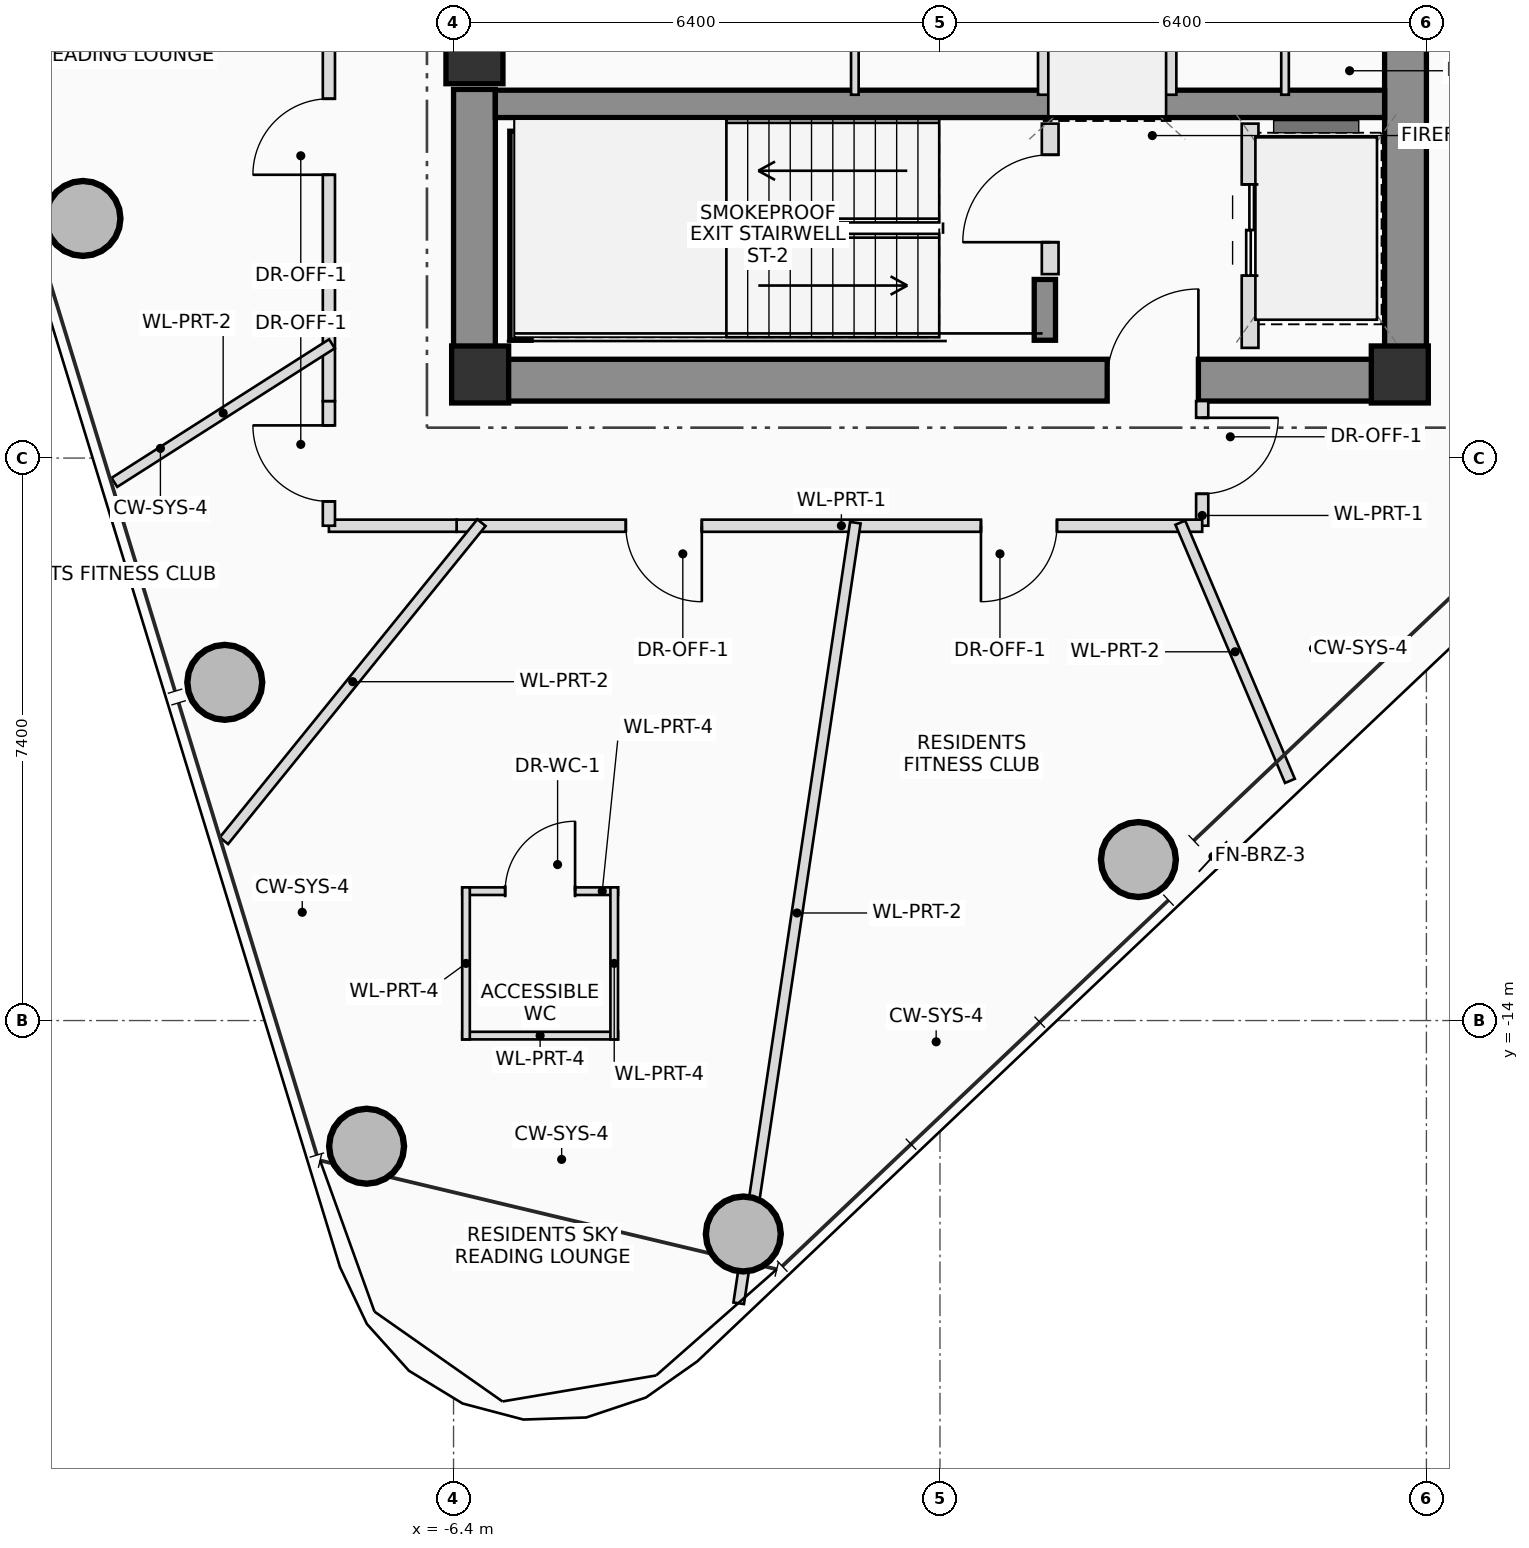
"""IFC4 building model, lengths in metres.
Left out: names, types, materials, properties, quantities, classifications, styles, units other than length and angle.
Written with IfcOpenShell. Run it as: python <this file> out.ifc"""

import sys

from ifc_helpers import new_model, si_unit, direction, frame, frame_2d, origin, origin_2d, place, context, subcontext, project, spatial, rectangle, hollow_circle, extrude, source, transform, mapped, element, fill, save


model = new_model("IFC4")
c1 = context("Model", 3, precision=1e-05, world=origin(), true_north=direction((0.0, 1.0)))
c2 = subcontext(c1, "Body", "Model", "MODEL_VIEW")
j1 = project(units=[si_unit("LENGTHUNIT", "METRE"), si_unit("PLANEANGLEUNIT", "RADIAN")], contexts=[c1])
p1 = place(None, origin())
s1 = spatial("IfcSite", under=j1, at=p1, CompositionType="ELEMENT")
p2 = place(p1, origin())
s2 = spatial("IfcBuilding", under=s1, at=p2, CompositionType="ELEMENT")
p3 = place(p2, frame((0.0, 0.0, 228.65)))
s3 = spatial("IfcBuildingStorey", under=s2, at=p3, CompositionType="ELEMENT", Elevation=228.65)
m1 = source(origin(), c2, "Body", "SweptSolid", [
    extrude(rectangle(XDim=0.75, YDim=0.75, at=origin_2d()), origin(), (0.0, 0.0, 1.0), 3.4),
])
for number, where, z_axis, x_axis in (
    (1, (-6.05, -5.5, 0.0), (0.0, 0.0, 1.0), (1.0, 0.0, 0.0)),
    (2, (6.05, -5.5, 0.0), (0.0, 0.0, 1.0), (1.0, 0.0, 0.0)),
):
    element("IfcColumn", number, at=place(p3, frame(where, z_axis=z_axis, x_axis=x_axis)), inside=s3, PredefinedType="COLUMN", context=c2, shape_type="MappedRepresentation", body=[
        mapped(m1, transform((0.0, 0.0, 0.0), scale=1.0)),
    ])
p4 = place(p3, frame((-6.4, -5.575, 0.0), z_axis=(0.0, 0.0, 1.0), x_axis=(1.0, 0.0, 0.0)))
e3 = element("IfcWall", 3, at=p4, inside=s3, PredefinedType="SHEAR", context=c2, shape_type="SweptSolid", body=[
    extrude(rectangle(XDim=12.8, YDim=0.55, at=frame_2d((6.4, 0.0))), origin(), (0.0, 0.0, 1.0), 3.4),
])
p5 = place(p4, frame((8.6, 0.0, 0.0)))
e4 = element("IfcOpeningElement", 4, at=p5, cuts=e3, PredefinedType="OPENING", context=c2, shape_type="SweptSolid", body=[
    extrude(rectangle(XDim=1.2, YDim=2.2, at=frame_2d((0.6, 1.1))), frame((0.0, 0.285, 0.0), z_axis=(0.0, -1.0, 0.0), x_axis=(1.0, 0.0, 0.0)), (0.0, 0.0, 1.0), 0.57),
])
p6 = place(p3, frame((6.125, -5.3, 0.0), z_axis=(0.0, 0.0, 1.0), x_axis=(0.0, 1.0, 0.0)))
e5 = element("IfcWall", 5, at=p6, inside=s3, PredefinedType="SHEAR", context=c2, shape_type="SweptSolid", body=[
    extrude(rectangle(XDim=10.6, YDim=0.55, at=frame_2d((5.3, 0.0))), origin(), (0.0, 0.0, 1.0), 3.4),
])
p7 = place(p3, frame((-6.125, -5.3, 0.0), z_axis=(0.0, 0.0, 1.0), x_axis=(0.0, 1.0, 0.0)))
e6 = element("IfcWall", 6, at=p7, inside=s3, PredefinedType="SHEAR", context=c2, shape_type="SweptSolid", body=[
    extrude(rectangle(XDim=3.55, YDim=0.55, at=frame_2d((1.775, 0.0))), origin(), (0.0, 0.0, 1.0), 3.4),
])
p8 = place(p3, frame((-5.85, -1.94, 0.0), z_axis=(0.0, 0.0, 1.0), x_axis=(1.0, 0.0, 0.0)))
e7 = element("IfcWall", 7, at=p8, inside=s3, PredefinedType="SHEAR", context=c2, shape_type="SweptSolid", body=[
    extrude(rectangle(XDim=11.7, YDim=0.36, at=frame_2d((5.85, 0.0))), origin(), (0.0, 0.0, 1.0), 3.4),
])
p9 = place(p3, frame((-5.52, -5.05, 0.0), z_axis=(0.0, 0.0, 1.0), x_axis=(0.0, 1.0, 0.0)))
e8 = element("IfcWall", 8, at=p9, inside=s3, PredefinedType="SHEAR", context=c2, shape_type="SweptSolid", body=[
    extrude(rectangle(XDim=2.75, YDim=0.28, at=frame_2d((1.375, 0.0))), origin(), (0.0, 0.0, 1.0), 3.4),
])
p10 = place(p3, frame((1.38, -5.05, 0.0), z_axis=(0.0, 0.0, 1.0), x_axis=(0.0, 1.0, 0.0)))
e9 = element("IfcWall", 9, at=p10, inside=s3, PredefinedType="SHEAR", context=c2, shape_type="SweptSolid", body=[
    extrude(rectangle(XDim=0.8, YDim=0.28, at=frame_2d((0.4, 0.0))), origin(), (0.0, 0.0, 1.0), 3.4),
])
p11 = place(p3, frame((-6.125, -1.3, 0.0), z_axis=(0.0, 0.0, 1.0), x_axis=(1.0, 0.0, 0.0)))
e10 = element("IfcColumn", 10, at=p11, inside=s3, PredefinedType="COLUMN", context=c2, shape_type="MappedRepresentation", body=[
    mapped(m1, transform((0.0, 0.0, 0.0), scale=1.0)),
])
m2 = source(origin(), c2, "Body", "SweptSolid", [
    extrude(hollow_circle(Radius=0.5, WallThickness=0.04, at=origin_2d()), origin(), (0.0, 0.0, 1.0), 3.4),
])
for number, where, z_axis, x_axis in (
    (11, (-2.587, -16.808, 0.0), (0.0, 0.0, 1.0), (1.0, 0.0, 0.0)),
    (12, (2.611, -11.882, 0.0), (0.0, 0.0, 1.0), (1.0, 0.0, 0.0)),
    (13, (-11.276, -3.448, 0.0), (0.0, 0.0, 1.0), (1.0, 0.0, 0.0)),
    (14, (-9.41, -9.55, 0.0), (0.0, 0.0, 1.0), (1.0, 0.0, 0.0)),
    (15, (-7.544, -15.653, 0.0), (0.0, 0.0, 1.0), (1.0, 0.0, 0.0)),
):
    element("IfcColumn", number, at=place(p3, frame(where, z_axis=z_axis, x_axis=x_axis)), inside=s3, PredefinedType="COLUMN", context=c2, shape_type="MappedRepresentation", body=[
        mapped(m2, transform((0.0, 0.0, 0.0), scale=1.0)),
    ])
p12 = place(p3, frame((1.45, -4.18, 0.0), z_axis=(0.0, 0.0, 1.0), x_axis=(0.0, 1.0, 0.0)))
e16 = element("IfcWall", 16, at=p12, inside=s3, PredefinedType="PLUMBINGWALL", context=c2, shape_type="SweptSolid", body=[
    extrude(rectangle(XDim=1.98, YDim=0.22, at=frame_2d((0.99, 0.0))), origin(), (0.0, 0.0, 1.0), 3.2),
])
p13 = place(p12, frame((0.42, 0.0, 0.0)))
e17 = element("IfcOpeningElement", 17, at=p13, cuts=e16, PredefinedType="OPENING", context=c2, shape_type="SweptSolid", body=[
    extrude(rectangle(XDim=1.15, YDim=2.15, at=frame_2d((0.575, 1.075))), frame((0.0, 0.12, 0.0), z_axis=(0.0, -1.0, 0.0), x_axis=(1.0, 0.0, 0.0)), (0.0, 0.0, 1.0), 0.24),
])
p14 = place(p3, frame((4.08, -5.15, 0.0), z_axis=(0.0, 0.0, 1.0), x_axis=(0.0, 1.0, 0.0)))
e18 = element("IfcWall", 18, at=p14, inside=s3, PredefinedType="PLUMBINGWALL", context=c2, shape_type="SweptSolid", body=[
    extrude(rectangle(XDim=2.95, YDim=0.22, at=frame_2d((1.475, 0.0))), origin(), (0.0, 0.0, 1.0), 3.2),
])
p15 = place(p14, frame((0.95, 0.0, 0.0)))
e19 = element("IfcOpeningElement", 19, at=p15, cuts=e18, PredefinedType="OPENING", context=c2, shape_type="SweptSolid", body=[
    extrude(rectangle(XDim=1.2, YDim=2.25, at=frame_2d((0.6, 1.125))), frame((0.0, 0.12, 0.0), z_axis=(0.0, -1.0, 0.0), x_axis=(1.0, 0.0, 0.0)), (0.0, 0.0, 1.0), 0.24),
])
p16 = place(p3, frame((-1.12, -1.82, 0.0), z_axis=(0.0, 0.0, 1.0), x_axis=(0.0, 1.0, 0.0)))
e20 = element("IfcWall", 20, at=p16, inside=s3, PredefinedType="PARTITIONING", context=c2, shape_type="SweptSolid", body=[
    extrude(rectangle(XDim=0.98, YDim=0.1, at=frame_2d((0.49, 0.0))), origin(), (0.0, 0.0, 1.0), 3.2),
])
for number, where, z_axis, x_axis in (
    (21, (1.38, -1.82, 0.0), (0.0, 0.0, 1.0), (0.0, 1.0, 0.0)),
    (22, (3.02, -1.82, 0.0), (0.0, 0.0, 1.0), (0.0, 1.0, 0.0)),
):
    element("IfcWall", number, at=place(p3, frame(where, z_axis=z_axis, x_axis=x_axis)), inside=s3, PredefinedType="PLUMBINGWALL", context=c2, shape_type="SweptSolid", body=[
        extrude(rectangle(XDim=0.98, YDim=0.18, at=frame_2d((0.49, 0.0))), origin(), (0.0, 0.0, 1.0), 3.2),
    ])
p17 = place(p3, frame((4.54, -1.82, 0.0), z_axis=(0.0, 0.0, 1.0), x_axis=(0.0, 1.0, 0.0)))
e23 = element("IfcWall", 23, at=p17, inside=s3, PredefinedType="PARTITIONING", context=c2, shape_type="SweptSolid", body=[
    extrude(rectangle(XDim=0.98, YDim=0.1, at=frame_2d((0.49, 0.0))), origin(), (0.0, 0.0, 1.0), 3.2),
])
p18 = place(p3, frame((-6.286, -12.298, 0.0), z_axis=(0.0, 0.0, 1.0), x_axis=(1.0, 0.0, 0.0)))
e24 = element("IfcWall", 24, at=p18, inside=s3, PredefinedType="PARTITIONING", context=c2, shape_type="SweptSolid", body=[
    extrude(rectangle(XDim=2.05, YDim=0.1, at=frame_2d((1.025, 0.0))), origin(), (0.0, 0.0, 1.0), 3.2),
])
p19 = place(p18, frame((0.565, 0.0, 0.0)))
e25 = element("IfcOpeningElement", 25, at=p19, cuts=e24, PredefinedType="OPENING", context=c2, shape_type="SweptSolid", body=[
    extrude(rectangle(XDim=0.92, YDim=2.1, at=frame_2d((0.46, 1.05))), frame((0.0, 0.06, 0.0), z_axis=(0.0, -1.0, 0.0), x_axis=(1.0, 0.0, 0.0)), (0.0, 0.0, 1.0), 0.12),
])
p20 = place(p3, frame((-4.236, -14.198, 0.0), z_axis=(0.0, 0.0, 1.0), x_axis=(-1.0, 0.0, 0.0)))
e26 = element("IfcWall", 26, at=p20, inside=s3, PredefinedType="PARTITIONING", context=c2, shape_type="SweptSolid", body=[
    extrude(rectangle(XDim=2.05, YDim=0.1, at=frame_2d((1.025, 0.0))), origin(), (0.0, 0.0, 1.0), 3.2),
])
for number, where, z_axis, x_axis in (
    (27, (-4.286, -12.248, 0.0), (0.0, 0.0, 1.0), (0.0, -1.0, 0.0)),
    (28, (-6.236, -14.248, 0.0), (0.0, 0.0, 1.0), (0.0, 1.0, 0.0)),
):
    element("IfcWall", number, at=place(p3, frame(where, z_axis=z_axis, x_axis=x_axis)), inside=s3, PredefinedType="PARTITIONING", context=c2, shape_type="SweptSolid", body=[
        extrude(rectangle(XDim=2.0, YDim=0.1, at=frame_2d((1.0, 0.0))), origin(), (0.0, 0.0, 1.0), 2.855),
    ])
p21 = place(p3, frame((3.45, -5.85, 0.0), z_axis=(0.0, 0.0, 1.0), x_axis=(0.0, -1.0, 0.0)))
e29 = element("IfcWall", 29, at=p21, inside=s3, PredefinedType="PARTITIONING", context=c2, shape_type="SweptSolid", body=[
    extrude(rectangle(XDim=1.64, YDim=0.16, at=frame_2d((0.82, 0.0))), origin(), (0.0, 0.0, 1.0), 3.2),
])
p22 = place(p21, frame((0.22, 0.0, 0.0)))
e30 = element("IfcOpeningElement", 30, at=p22, cuts=e29, PredefinedType="OPENING", context=c2, shape_type="SweptSolid", body=[
    extrude(rectangle(XDim=1.0, YDim=2.25, at=frame_2d((0.5, 1.125))), frame((0.0, 0.09, 0.0), z_axis=(0.0, -1.0, 0.0), x_axis=(1.0, 0.0, 0.0)), (0.0, 0.0, 1.0), 0.18),
])
p23 = place(p3, frame((3.45, -7.49, 0.0), z_axis=(0.0, 0.0, 1.0), x_axis=(-1.0, 0.0, 0.0)))
e31 = element("IfcWall", 31, at=p23, inside=s3, PredefinedType="PARTITIONING", context=c2, shape_type="SweptSolid", body=[
    extrude(rectangle(XDim=9.81, YDim=0.16, at=frame_2d((4.905, 0.0))), origin(), (0.0, 0.0, 1.0), 2.605),
])
p24 = place(p23, frame((1.911, 0.0, 0.0)))
e32 = element("IfcOpeningElement", 32, at=p24, cuts=e31, PredefinedType="OPENING", context=c2, shape_type="SweptSolid", body=[
    extrude(rectangle(XDim=1.0, YDim=2.25, at=frame_2d((0.5, 1.125))), frame((0.0, 0.09, 0.0), z_axis=(0.0, -1.0, 0.0), x_axis=(1.0, 0.0, 0.0)), (0.0, 0.0, 1.0), 0.18),
])
p25 = place(p23, frame((6.583, 0.0, 0.0)))
e33 = element("IfcOpeningElement", 33, at=p25, cuts=e31, PredefinedType="OPENING", context=c2, shape_type="SweptSolid", body=[
    extrude(rectangle(XDim=1.0, YDim=2.25, at=frame_2d((0.5, 1.125))), frame((0.0, 0.09, 0.0), z_axis=(0.0, -1.0, 0.0), x_axis=(1.0, 0.0, 0.0)), (0.0, 0.0, 1.0), 0.18),
])
p26 = place(p3, frame((-6.36, -7.49, 0.0), z_axis=(0.0, 0.0, 1.0), x_axis=(-1.0, 0.0, 0.0)))
e34 = element("IfcWall", 34, at=p26, inside=s3, PredefinedType="PARTITIONING", context=c2, shape_type="SweptSolid", body=[
    extrude(rectangle(XDim=1.68, YDim=0.16, at=frame_2d((0.84, 0.0))), origin(), (0.0, 0.0, 1.0), 2.605),
])
p27 = place(p3, frame((-8.04, -7.49, 0.0), z_axis=(0.0, 0.0, 1.0), x_axis=(0.0, 1.0, 0.0)))
e35 = element("IfcWall", 35, at=p27, inside=s3, PredefinedType="PARTITIONING", context=c2, shape_type="SweptSolid", body=[
    extrude(rectangle(XDim=1.64, YDim=0.16, at=frame_2d((0.82, 0.0))), origin(), (0.0, 0.0, 1.0), 2.805),
])
p28 = place(p27, frame((0.32, 0.0, 0.0)))
e36 = element("IfcOpeningElement", 36, at=p28, cuts=e35, PredefinedType="OPENING", context=c2, shape_type="SweptSolid", body=[
    extrude(rectangle(XDim=1.0, YDim=2.25, at=frame_2d((0.5, 1.125))), frame((0.0, 0.09, 0.0), z_axis=(0.0, -1.0, 0.0), x_axis=(1.0, 0.0, 0.0)), (0.0, 0.0, 1.0), 0.18),
])
p29 = place(p3, frame((-8.04, -5.85, 0.0), z_axis=(0.0, 0.0, 1.0), x_axis=(0.0, 1.0, 0.0)))
e37 = element("IfcWall", 37, at=p29, inside=s3, PredefinedType="PARTITIONING", context=c2, shape_type="SweptSolid", body=[
    extrude(rectangle(XDim=11.7, YDim=0.16, at=frame_2d((5.85, 0.0))), origin(), (0.0, 0.0, 1.0), 2.605),
])
p30 = place(p29, frame((2.977, 0.0, 0.0)))
e38 = element("IfcOpeningElement", 38, at=p30, cuts=e37, PredefinedType="OPENING", context=c2, shape_type="SweptSolid", body=[
    extrude(rectangle(XDim=1.0, YDim=2.25, at=frame_2d((0.5, 1.125))), frame((0.0, 0.09, 0.0), z_axis=(0.0, -1.0, 0.0), x_axis=(1.0, 0.0, 0.0)), (0.0, 0.0, 1.0), 0.18),
])
p31 = place(p29, frame((6.919, 0.0, 0.0)))
e39 = element("IfcOpeningElement", 39, at=p31, cuts=e37, PredefinedType="OPENING", context=c2, shape_type="SweptSolid", body=[
    extrude(rectangle(XDim=1.0, YDim=2.25, at=frame_2d((0.5, 1.125))), frame((0.0, 0.09, 0.0), z_axis=(0.0, -1.0, 0.0), x_axis=(1.0, 0.0, 0.0)), (0.0, 0.0, 1.0), 0.18),
])
p32 = place(p3, frame((-8.0, -5.097, 0.0), z_axis=(0.0, 0.0, 1.0), x_axis=(-0.843391828446, -0.537299007733, 0.0)))
e40 = element("IfcWall", 40, at=p32, inside=s3, PredefinedType="PARTITIONING", context=c2, shape_type="SweptSolid", body=[
    extrude(rectangle(XDim=3.394, YDim=0.14, at=frame_2d((1.697, 0.0))), origin(), (0.0, 0.0, 1.0), 2.765),
])
p33 = place(p3, frame((-6.033, -7.45, 0.0), z_axis=(0.0, 0.0, 1.0), x_axis=(-0.629318234002, -0.777147708195, 0.0)))
e41 = element("IfcWall", 41, at=p33, inside=s3, PredefinedType="PARTITIONING", context=c2, shape_type="SweptSolid", body=[
    extrude(rectangle(XDim=5.384, YDim=0.14, at=frame_2d((2.692, 0.0))), origin(), (0.0, 0.0, 1.0), 2.605),
])
p34 = place(p3, frame((-1.113, -7.45, 0.0), z_axis=(0.0, 0.0, 1.0), x_axis=(-0.147817313856, -0.989014682259, 0.0)))
e42 = element("IfcWall", 42, at=p34, inside=s3, PredefinedType="PARTITIONING", context=c2, shape_type="SweptSolid", body=[
    extrude(rectangle(XDim=10.384, YDim=0.14, at=frame_2d((5.192, 0.0))), origin(), (0.0, 0.0, 1.0), 2.805),
])
p35 = place(p3, frame((3.162, -7.45, 0.0), z_axis=(0.0, 0.0, 1.0), x_axis=(0.39072313519, -0.920508246366, 0.0)))
e43 = element("IfcWall", 43, at=p35, inside=s3, PredefinedType="PARTITIONING", context=c2, shape_type="SweptSolid", body=[
    extrude(rectangle(XDim=3.69, YDim=0.14, at=frame_2d((1.845, 0.0))), origin(), (0.0, 0.0, 1.0), 2.605),
])
p36 = place(p5, origin())
e44 = element("IfcDoor", 44, at=p36, inside=s3, OperationType="SINGLE_SWING_RIGHT", PredefinedType="DOOR", context=c2, shape_type="SweptSolid", body=[
    extrude(rectangle(XDim=1.2, YDim=2.2, at=frame_2d((0.6, 1.1))), frame((0.0, 0.025, 0.0), z_axis=(0.0, -1.0, 0.0), x_axis=(1.0, 0.0, 0.0)), (0.0, 0.0, 1.0), 0.05),
])
fill(e4, e44)
p37 = place(p13, origin())
e45 = element("IfcDoor", 45, at=p37, inside=s3, OperationType="SINGLE_SWING_LEFT", PredefinedType="DOOR", context=c2, shape_type="SweptSolid", body=[
    extrude(rectangle(XDim=1.15, YDim=2.15, at=frame_2d((0.575, 1.075))), frame((0.0, 0.025, 0.0), z_axis=(0.0, -1.0, 0.0), x_axis=(1.0, 0.0, 0.0)), (0.0, 0.0, 1.0), 0.05),
])
fill(e17, e45)
p38 = place(p15, origin())
e46 = element("IfcDoor", 46, at=p38, inside=s3, OperationType="DOUBLE_DOOR_SLIDING", PredefinedType="DOOR", context=c2, shape_type="SweptSolid", body=[
    extrude(rectangle(XDim=1.2, YDim=2.25, at=frame_2d((0.6, 1.125))), frame((0.0, 0.025, 0.0), z_axis=(0.0, -1.0, 0.0), x_axis=(1.0, 0.0, 0.0)), (0.0, 0.0, 1.0), 0.05),
])
fill(e19, e46)
p39 = place(p19, origin())
e47 = element("IfcDoor", 47, at=p39, inside=s3, OperationType="SINGLE_SWING_RIGHT", PredefinedType="DOOR", context=c2, shape_type="SweptSolid", body=[
    extrude(rectangle(XDim=0.92, YDim=2.1, at=frame_2d((0.46, 1.05))), frame((0.0, 0.025, 0.0), z_axis=(0.0, -1.0, 0.0), x_axis=(1.0, 0.0, 0.0)), (0.0, 0.0, 1.0), 0.05),
])
fill(e25, e47)
p40 = place(p22, origin())
e48 = element("IfcDoor", 48, at=p40, inside=s3, OperationType="SINGLE_SWING_LEFT", PredefinedType="DOOR", context=c2, shape_type="SweptSolid", body=[
    extrude(rectangle(XDim=1.0, YDim=2.25, at=frame_2d((0.5, 1.125))), frame((0.0, 0.025, 0.0), z_axis=(0.0, -1.0, 0.0), x_axis=(1.0, 0.0, 0.0)), (0.0, 0.0, 1.0), 0.05),
])
fill(e30, e48)
p41 = place(p24, origin())
e49 = element("IfcDoor", 49, at=p41, inside=s3, OperationType="SINGLE_SWING_RIGHT", PredefinedType="DOOR", context=c2, shape_type="SweptSolid", body=[
    extrude(rectangle(XDim=1.0, YDim=2.25, at=frame_2d((0.5, 1.125))), frame((0.0, 0.025, 0.0), z_axis=(0.0, -1.0, 0.0), x_axis=(1.0, 0.0, 0.0)), (0.0, 0.0, 1.0), 0.05),
])
fill(e32, e49)
p42 = place(p25, origin())
e50 = element("IfcDoor", 50, at=p42, inside=s3, OperationType="SINGLE_SWING_LEFT", PredefinedType="DOOR", context=c2, shape_type="SweptSolid", body=[
    extrude(rectangle(XDim=1.0, YDim=2.25, at=frame_2d((0.5, 1.125))), frame((0.0, 0.025, 0.0), z_axis=(0.0, -1.0, 0.0), x_axis=(1.0, 0.0, 0.0)), (0.0, 0.0, 1.0), 0.05),
])
fill(e33, e50)
p43 = place(p28, origin())
e51 = element("IfcDoor", 51, at=p43, inside=s3, OperationType="SINGLE_SWING_RIGHT", PredefinedType="DOOR", context=c2, shape_type="SweptSolid", body=[
    extrude(rectangle(XDim=1.0, YDim=2.25, at=frame_2d((0.5, 1.125))), frame((0.0, 0.025, 0.0), z_axis=(0.0, -1.0, 0.0), x_axis=(1.0, 0.0, 0.0)), (0.0, 0.0, 1.0), 0.05),
])
fill(e36, e51)
p44 = place(p30, origin())
e52 = element("IfcDoor", 52, at=p44, inside=s3, OperationType="SINGLE_SWING_LEFT", PredefinedType="DOOR", context=c2, shape_type="SweptSolid", body=[
    extrude(rectangle(XDim=1.0, YDim=2.25, at=frame_2d((0.5, 1.125))), frame((0.0, 0.025, 0.0), z_axis=(0.0, -1.0, 0.0), x_axis=(1.0, 0.0, 0.0)), (0.0, 0.0, 1.0), 0.05),
])
fill(e38, e52)
save(model, sys.argv[1])
